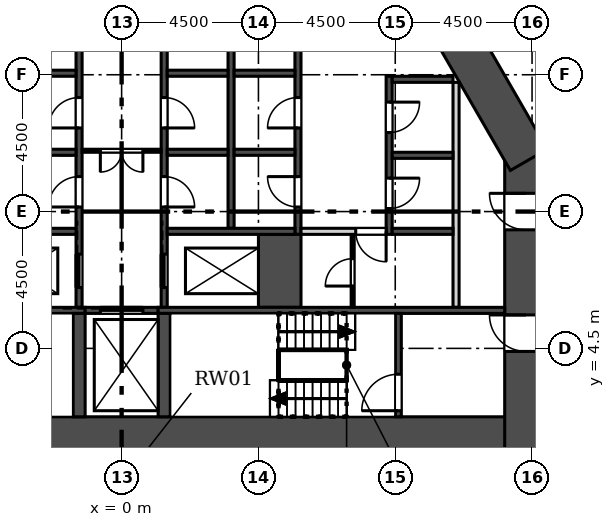
"""IFC4 building model, lengths in metres.
Left out: names, types, materials, properties, quantities, classifications, styles, units other than length and angle.
Written with IfcOpenShell. Run it as: python <this file> out.ifc"""

import sys

from ifc_helpers import new_model, si_unit, direction, frame, frame_2d, origin, place, context, subcontext, project, spatial, rectangle, extrude, element, fill, save


model = new_model("IFC4")
c1 = context("Model", 3, precision=1e-05, world=origin(), true_north=direction((0.0, 1.0)))
c2 = subcontext(c1, "Body", "Model", "MODEL_VIEW")
j1 = project(units=[si_unit("LENGTHUNIT", "METRE"), si_unit("PLANEANGLEUNIT", "RADIAN")], contexts=[c1])
p1 = place(None, origin())
s1 = spatial("IfcSite", under=j1, at=p1, CompositionType="ELEMENT")
p2 = place(p1, origin())
s2 = spatial("IfcBuilding", under=s1, at=p2, CompositionType="ELEMENT")
p3 = place(p2, frame((0.0, 0.0, -14.0)))
s3 = spatial("IfcBuildingStorey", under=s2, at=p3, CompositionType="ELEMENT", Elevation=-14.0)
p4 = place(p3, frame((42.971, 8.51, -0.4), z_axis=(0.0, 0.0, 1.0), x_axis=(-0.499999312333, 0.866025800809, 0.0)))
e1 = element("IfcWall", 1, at=p4, inside=s3, PredefinedType="SOLIDWALL", context=c2, shape_type="SweptSolid", body=[
    extrude(rectangle(XDim=76.231, YDim=0.6, at=frame_2d((38.115, 0.0))), origin(), (0.0, 0.0, 1.0), 6.4),
])
p5 = place(p3, frame((-14.0, 1.55, 0.0), z_axis=(0.0, 0.0, 1.0), x_axis=(1.0, 0.0, 0.0)))
e2 = element("IfcWall", 2, at=p5, inside=s3, PredefinedType="SHEAR", context=c2, shape_type="SweptSolid", body=[
    extrude(rectangle(XDim=28.0, YDim=1.4, at=frame_2d((14.0, 0.0))), origin(), (0.0, 0.0, 1.0), 6.0),
])
p6 = place(p3, frame((13.3, 0.85, 0.0), z_axis=(0.0, 0.0, 1.0), x_axis=(0.0, 1.0, 0.0)))
e3 = element("IfcWall", 3, at=p6, inside=s3, PredefinedType="SHEAR", context=c2, shape_type="SweptSolid", body=[
    extrude(rectangle(XDim=10.202, YDim=1.4, at=frame_2d((5.101, 0.0))), origin(), (0.0, 0.0, 1.0), 6.0),
])
p7 = place(p6, frame((3.55, 0.0, 0.0)))
e4 = element("IfcOpeningElement", 4, at=p7, cuts=e3, PredefinedType="OPENING", context=c2, shape_type="SweptSolid", body=[
    extrude(rectangle(XDim=1.2, YDim=2.1, at=frame_2d((0.6, 1.05))), frame((0.0, 0.71, 0.0), z_axis=(0.0, -1.0, 0.0), x_axis=(1.0, 0.0, 0.0)), (0.0, 0.0, 1.0), 1.42),
])
p8 = place(p6, frame((7.55, 0.0, 0.0)))
e5 = element("IfcOpeningElement", 5, at=p8, cuts=e3, PredefinedType="OPENING", context=c2, shape_type="SweptSolid", body=[
    extrude(rectangle(XDim=1.2, YDim=2.1, at=frame_2d((0.6, 1.05))), frame((0.0, 0.71, 0.0), z_axis=(0.0, -1.0, 0.0), x_axis=(1.0, 0.0, 0.0)), (0.0, 0.0, 1.0), 1.42),
])
p9 = place(p3, frame((13.394, 10.703, 0.0), z_axis=(0.0, 0.0, 1.0), x_axis=(-0.50000187635, 0.866024320471, 0.0)))
e6 = element("IfcWall", 6, at=p9, inside=s3, PredefinedType="SHEAR", context=c2, shape_type="SweptSolid", body=[
    extrude(rectangle(XDim=9.177, YDim=1.4, at=frame_2d((4.588, 0.0))), origin(), (0.0, 0.0, 1.0), 6.0),
])
p10 = place(p3, frame((11.0, 5.85, 0.0), z_axis=(0.0, 0.0, 1.0), x_axis=(0.0, 1.0, 0.0)))
e7 = element("IfcWall", 7, at=p10, inside=s3, PredefinedType="SOLIDWALL", context=c2, shape_type="SweptSolid", body=[
    extrude(rectangle(XDim=7.4, YDim=0.2, at=frame_2d((3.7, 0.0))), origin(), (0.0, 0.0, 1.0), 5.65),
])
p11 = place(p3, frame((8.8, 8.25, 0.0), z_axis=(0.0, 0.0, 1.0), x_axis=(0.0, 1.0, 0.0)))
e8 = element("IfcWall", 8, at=p11, inside=s3, PredefinedType="SOLIDWALL", context=c2, shape_type="SweptSolid", body=[
    extrude(rectangle(XDim=5.2, YDim=0.2, at=frame_2d((2.6, 0.0))), origin(), (0.0, 0.0, 1.0), 5.65),
])
p12 = place(p11, frame((0.85, 0.0, 0.0)))
e9 = element("IfcOpeningElement", 9, at=p12, cuts=e8, PredefinedType="OPENING", context=c2, shape_type="SweptSolid", body=[
    extrude(rectangle(XDim=1.0, YDim=2.1, at=frame_2d((0.5, 1.05))), frame((0.0, 0.11, 0.0), z_axis=(0.0, -1.0, 0.0), x_axis=(1.0, 0.0, 0.0)), (0.0, 0.0, 1.0), 0.22),
])
p13 = place(p11, frame((3.35, 0.0, 0.0)))
e10 = element("IfcOpeningElement", 10, at=p13, cuts=e8, PredefinedType="OPENING", context=c2, shape_type="SweptSolid", body=[
    extrude(rectangle(XDim=1.0, YDim=2.1, at=frame_2d((0.5, 1.05))), frame((0.0, 0.11, 0.0), z_axis=(0.0, -1.0, 0.0), x_axis=(1.0, 0.0, 0.0)), (0.0, 0.0, 1.0), 0.22),
])
p14 = place(p3, frame((5.8, 8.25, 0.0), z_axis=(0.0, 0.0, 1.0), x_axis=(0.0, 1.0, 0.0)))
e11 = element("IfcWall", 11, at=p14, inside=s3, PredefinedType="SOLIDWALL", context=c2, shape_type="SweptSolid", body=[
    extrude(rectangle(XDim=8.0, YDim=0.2, at=frame_2d((4.0, 0.0))), origin(), (0.0, 0.0, 1.0), 5.65),
])
p15 = place(p14, frame((0.9, 0.0, 0.0)))
e12 = element("IfcOpeningElement", 12, at=p15, cuts=e11, PredefinedType="OPENING", context=c2, shape_type="SweptSolid", body=[
    extrude(rectangle(XDim=1.0, YDim=2.1, at=frame_2d((0.5, 1.05))), frame((0.0, 0.11, 0.0), z_axis=(0.0, -1.0, 0.0), x_axis=(1.0, 0.0, 0.0)), (0.0, 0.0, 1.0), 0.22),
])
p16 = place(p14, frame((3.5, 0.0, 0.0)))
e13 = element("IfcOpeningElement", 13, at=p16, cuts=e11, PredefinedType="OPENING", context=c2, shape_type="SweptSolid", body=[
    extrude(rectangle(XDim=1.0, YDim=2.1, at=frame_2d((0.5, 1.05))), frame((0.0, 0.11, 0.0), z_axis=(0.0, -1.0, 0.0), x_axis=(1.0, 0.0, 0.0)), (0.0, 0.0, 1.0), 0.22),
])
p17 = place(p14, frame((6.1, 0.0, 0.0)))
e14 = element("IfcOpeningElement", 14, at=p17, cuts=e11, PredefinedType="OPENING", context=c2, shape_type="SweptSolid", body=[
    extrude(rectangle(XDim=1.0, YDim=2.1, at=frame_2d((0.5, 1.05))), frame((0.0, 0.11, 0.0), z_axis=(0.0, -1.0, 0.0), x_axis=(1.0, 0.0, 0.0)), (0.0, 0.0, 1.0), 0.22),
])
p18 = place(p3, frame((3.6, 8.45, 0.0), z_axis=(0.0, 0.0, 1.0), x_axis=(0.0, 1.0, 0.0)))
e15 = element("IfcWall", 15, at=p18, inside=s3, PredefinedType="SOLIDWALL", context=c2, shape_type="SweptSolid", body=[
    extrude(rectangle(XDim=7.8, YDim=0.2, at=frame_2d((3.9, 0.0))), origin(), (0.0, 0.0, 1.0), 5.65),
])
p19 = place(p3, frame((-1.4, 5.85, 0.0), z_axis=(0.0, 0.0, 1.0), x_axis=(0.0, 1.0, 0.0)))
e16 = element("IfcWall", 16, at=p19, inside=s3, PredefinedType="SOLIDWALL", context=c2, shape_type="SweptSolid", body=[
    extrude(rectangle(XDim=11.75, YDim=0.2, at=frame_2d((5.875, 0.0))), origin(), (0.0, 0.0, 1.0), 5.65),
])
p20 = place(p19, frame((0.65, 0.0, 0.0)))
e17 = element("IfcOpeningElement", 17, at=p20, cuts=e16, PredefinedType="OPENING", context=c2, shape_type="SweptSolid", body=[
    extrude(rectangle(XDim=1.1, YDim=2.1, at=frame_2d((0.55, 1.05))), frame((0.0, 0.11, 0.0), z_axis=(0.0, -1.0, 0.0), x_axis=(1.0, 0.0, 0.0)), (0.0, 0.0, 1.0), 0.22),
])
p21 = place(p19, frame((3.3, 0.0, 0.0)))
e18 = element("IfcOpeningElement", 18, at=p21, cuts=e16, PredefinedType="OPENING", context=c2, shape_type="SweptSolid", body=[
    extrude(rectangle(XDim=1.0, YDim=2.1, at=frame_2d((0.5, 1.05))), frame((0.0, 0.11, 0.0), z_axis=(0.0, -1.0, 0.0), x_axis=(1.0, 0.0, 0.0)), (0.0, 0.0, 1.0), 0.22),
])
p22 = place(p19, frame((5.9, 0.0, 0.0)))
e19 = element("IfcOpeningElement", 19, at=p22, cuts=e16, PredefinedType="OPENING", context=c2, shape_type="SweptSolid", body=[
    extrude(rectangle(XDim=1.0, YDim=2.1, at=frame_2d((0.5, 1.05))), frame((0.0, 0.11, 0.0), z_axis=(0.0, -1.0, 0.0), x_axis=(1.0, 0.0, 0.0)), (0.0, 0.0, 1.0), 0.22),
])
p23 = place(p19, frame((8.5, 0.0, 0.0)))
e20 = element("IfcOpeningElement", 20, at=p23, cuts=e16, PredefinedType="OPENING", context=c2, shape_type="SweptSolid", body=[
    extrude(rectangle(XDim=1.0, YDim=2.1, at=frame_2d((0.5, 1.05))), frame((0.0, 0.11, 0.0), z_axis=(0.0, -1.0, 0.0), x_axis=(1.0, 0.0, 0.0)), (0.0, 0.0, 1.0), 0.22),
])
p24 = place(p3, frame((1.4, 5.85, 0.0), z_axis=(0.0, 0.0, 1.0), x_axis=(0.0, 1.0, 0.0)))
e21 = element("IfcWall", 21, at=p24, inside=s3, PredefinedType="SOLIDWALL", context=c2, shape_type="SweptSolid", body=[
    extrude(rectangle(XDim=11.75, YDim=0.2, at=frame_2d((5.875, 0.0))), origin(), (0.0, 0.0, 1.0), 5.65),
])
p25 = place(p24, frame((0.65, 0.0, 0.0)))
e22 = element("IfcOpeningElement", 22, at=p25, cuts=e21, PredefinedType="OPENING", context=c2, shape_type="SweptSolid", body=[
    extrude(rectangle(XDim=1.1, YDim=2.1, at=frame_2d((0.55, 1.05))), frame((0.0, 0.11, 0.0), z_axis=(0.0, -1.0, 0.0), x_axis=(1.0, 0.0, 0.0)), (0.0, 0.0, 1.0), 0.22),
])
p26 = place(p24, frame((3.3, 0.0, 0.0)))
e23 = element("IfcOpeningElement", 23, at=p26, cuts=e21, PredefinedType="OPENING", context=c2, shape_type="SweptSolid", body=[
    extrude(rectangle(XDim=1.0, YDim=2.1, at=frame_2d((0.5, 1.05))), frame((0.0, 0.11, 0.0), z_axis=(0.0, -1.0, 0.0), x_axis=(1.0, 0.0, 0.0)), (0.0, 0.0, 1.0), 0.22),
])
p27 = place(p24, frame((5.9, 0.0, 0.0)))
e24 = element("IfcOpeningElement", 24, at=p27, cuts=e21, PredefinedType="OPENING", context=c2, shape_type="SweptSolid", body=[
    extrude(rectangle(XDim=1.0, YDim=2.1, at=frame_2d((0.5, 1.05))), frame((0.0, 0.11, 0.0), z_axis=(0.0, -1.0, 0.0), x_axis=(1.0, 0.0, 0.0)), (0.0, 0.0, 1.0), 0.22),
])
p28 = place(p24, frame((8.5, 0.0, 0.0)))
e25 = element("IfcOpeningElement", 25, at=p28, cuts=e21, PredefinedType="OPENING", context=c2, shape_type="SweptSolid", body=[
    extrude(rectangle(XDim=1.0, YDim=2.1, at=frame_2d((0.5, 1.05))), frame((0.0, 0.11, 0.0), z_axis=(0.0, -1.0, 0.0), x_axis=(1.0, 0.0, 0.0)), (0.0, 0.0, 1.0), 0.22),
])
p29 = place(p3, frame((5.2, 5.85, 0.0), z_axis=(0.0, 0.0, 1.0), x_axis=(0.0, 1.0, 0.0)))
e26 = element("IfcWall", 26, at=p29, inside=s3, PredefinedType="SOLIDWALL", context=c2, shape_type="SweptSolid", body=[
    extrude(rectangle(XDim=2.4, YDim=1.4, at=frame_2d((1.2, 0.0))), origin(), (0.0, 0.0, 1.0), 5.65),
])
p30 = place(p3, frame((8.9, 8.35, 0.0), z_axis=(0.0, 0.0, 1.0), x_axis=(1.0, 0.0, 0.0)))
e27 = element("IfcWall", 27, at=p30, inside=s3, PredefinedType="SOLIDWALL", context=c2, shape_type="SweptSolid", body=[
    extrude(rectangle(XDim=2.0, YDim=0.2, at=frame_2d((1.0, 0.0))), origin(), (0.0, 0.0, 1.0), 5.65),
])
for number, where, z_axis, x_axis in (
    (28, (-5.7, 8.35, 0.0), (0.0, 0.0, 1.0), (1.0, 0.0, 0.0)),
    (29, (1.5, 8.35, 0.0), (0.0, 0.0, 1.0), (1.0, 0.0, 0.0)),
):
    element("IfcWall", number, at=place(p3, frame(where, z_axis=z_axis, x_axis=x_axis)), inside=s3, PredefinedType="SOLIDWALL", context=c2, shape_type="SweptSolid", body=[
        extrude(rectangle(XDim=4.2, YDim=0.2, at=frame_2d((2.1, 0.0))), origin(), (0.0, 0.0, 1.0), 5.65),
    ])
p31 = place(p3, frame((-12.6, 5.75, 0.0), z_axis=(0.0, 0.0, 1.0), x_axis=(1.0, 0.0, 0.0)))
e30 = element("IfcWall", 30, at=p31, inside=s3, PredefinedType="SOLIDWALL", context=c2, shape_type="SweptSolid", body=[
    extrude(rectangle(XDim=11.4, YDim=0.2, at=frame_2d((5.7, 0.0))), origin(), (0.0, 0.0, 1.0), 5.65),
])
p32 = place(p3, frame((-1.2, 5.75, 0.0), z_axis=(0.0, 0.0, 1.0), x_axis=(1.0, 0.0, 0.0)))
e31 = element("IfcWall", 31, at=p32, inside=s3, PredefinedType="SOLIDWALL", context=c2, shape_type="SweptSolid", body=[
    extrude(rectangle(XDim=2.4, YDim=0.2, at=frame_2d((1.2, 0.0))), origin(), (0.0, 0.0, 1.0), 5.65),
])
p33 = place(p32, frame((0.5, 0.0, 0.0)))
e32 = element("IfcOpeningElement", 32, at=p33, cuts=e31, PredefinedType="OPENING", context=c2, shape_type="SweptSolid", body=[
    extrude(rectangle(XDim=1.4, YDim=2.1, at=frame_2d((0.7, 1.05))), frame((0.0, 0.11, 0.0), z_axis=(0.0, -1.0, 0.0), x_axis=(1.0, 0.0, 0.0)), (0.0, 0.0, 1.0), 0.22),
])
p34 = place(p3, frame((1.2, 5.75, 0.0), z_axis=(0.0, 0.0, 1.0), x_axis=(1.0, 0.0, 0.0)))
e33 = element("IfcWall", 33, at=p34, inside=s3, PredefinedType="SOLIDWALL", context=c2, shape_type="SweptSolid", body=[
    extrude(rectangle(XDim=11.4, YDim=0.2, at=frame_2d((5.7, 0.0))), origin(), (0.0, 0.0, 1.0), 5.65),
])
p35 = place(p3, frame((9.1, 2.25, 0.0), z_axis=(0.0, 0.0, 1.0), x_axis=(0.0, 1.0, 0.0)))
e34 = element("IfcWall", 34, at=p35, inside=s3, PredefinedType="SOLIDWALL", context=c2, shape_type="SweptSolid", body=[
    extrude(rectangle(XDim=3.4, YDim=0.2, at=frame_2d((1.7, 0.0))), origin(), (0.0, 0.0, 1.0), 5.65),
])
p36 = place(p35, frame((0.2, 0.0, 0.0)))
e35 = element("IfcOpeningElement", 35, at=p36, cuts=e34, PredefinedType="OPENING", context=c2, shape_type="SweptSolid", body=[
    extrude(rectangle(XDim=1.2, YDim=2.1, at=frame_2d((0.6, 1.05))), frame((0.0, 0.11, 0.0), z_axis=(0.0, -1.0, 0.0), x_axis=(1.0, 0.0, 0.0)), (0.0, 0.0, 1.0), 0.22),
])
for number, where, z_axis, x_axis in (
    (36, (-1.4, 2.25, 0.0), (0.0, 0.0, 1.0), (0.0, 1.0, 0.0)),
    (37, (1.4, 2.25, 0.0), (0.0, 0.0, 1.0), (0.0, 1.0, 0.0)),
):
    element("IfcWall", number, at=place(p3, frame(where, z_axis=z_axis, x_axis=x_axis)), inside=s3, PredefinedType="SOLIDWALL", context=c2, shape_type="SweptSolid", body=[
        extrude(rectangle(XDim=3.4, YDim=0.4, at=frame_2d((1.7, 0.0))), origin(), (0.0, 0.0, 1.0), 5.65),
    ])
for number, where, z_axis, x_axis in (
    (38, (-3.5, 10.95, 0.0), (0.0, 0.0, 1.0), (1.0, 0.0, 0.0)),
    (39, (-3.5, 13.55, 0.0), (0.0, 0.0, 1.0), (1.0, 0.0, 0.0)),
    (40, (8.9, 10.85, 0.0), (0.0, 0.0, 1.0), (1.0, 0.0, 0.0)),
    (41, (8.9, 13.35, 0.0), (0.0, 0.0, 1.0), (1.0, 0.0, 0.0)),
    (42, (3.7, 10.95, 0.0), (0.0, 0.0, 1.0), (1.0, 0.0, 0.0)),
    (43, (3.7, 13.55, 0.0), (0.0, 0.0, 1.0), (1.0, 0.0, 0.0)),
    (44, (1.5, 10.95, 0.0), (0.0, 0.0, 1.0), (1.0, 0.0, 0.0)),
    (45, (1.5, 13.55, 0.0), (0.0, 0.0, 1.0), (1.0, 0.0, 0.0)),
):
    element("IfcWall", number, at=place(p3, frame(where, z_axis=z_axis, x_axis=x_axis)), inside=s3, PredefinedType="SOLIDWALL", context=c2, shape_type="SweptSolid", body=[
        extrude(rectangle(XDim=2.0, YDim=0.2, at=frame_2d((1.0, 0.0))), origin(), (0.0, 0.0, 1.0), 5.65),
    ])
p37 = place(p3, frame((7.6, 5.85, 0.0), z_axis=(0.0, 0.0, 1.0), x_axis=(0.0, 1.0, 0.0)))
e46 = element("IfcWall", 46, at=p37, inside=s3, PredefinedType="PARTITIONING", context=c2, shape_type="SweptSolid", body=[
    extrude(rectangle(XDim=2.4, YDim=0.1, at=frame_2d((1.2, 0.0))), origin(), (0.0, 0.0, 1.0), 5.65),
])
p38 = place(p37, frame((0.7, 0.0, 0.0)))
e47 = element("IfcOpeningElement", 47, at=p38, cuts=e46, PredefinedType="OPENING", context=c2, shape_type="SweptSolid", body=[
    extrude(rectangle(XDim=0.9, YDim=2.1, at=frame_2d((0.45, 1.05))), frame((0.0, 0.06, 0.0), z_axis=(0.0, -1.0, 0.0), x_axis=(1.0, 0.0, 0.0)), (0.0, 0.0, 1.0), 0.12),
])
p39 = place(p3, frame((5.9, 8.35, 0.0), z_axis=(0.0, 0.0, 1.0), x_axis=(1.0, 0.0, 0.0)))
e48 = element("IfcWall", 48, at=p39, inside=s3, PredefinedType="SOLIDWALL", context=c2, shape_type="SweptSolid", body=[
    extrude(rectangle(XDim=2.8, YDim=0.2, at=frame_2d((1.4, 0.0))), origin(), (0.0, 0.0, 1.0), 5.65),
])
p40 = place(p39, frame((1.8, 0.0, 0.0)))
e49 = element("IfcOpeningElement", 49, at=p40, cuts=e48, PredefinedType="OPENING", context=c2, shape_type="SweptSolid", body=[
    extrude(rectangle(XDim=1.0, YDim=2.1, at=frame_2d((0.5, 1.05))), frame((0.0, 0.11, 0.0), z_axis=(0.0, -1.0, 0.0), x_axis=(1.0, 0.0, 0.0)), (0.0, 0.0, 1.0), 0.22),
])
p41 = place(p3, frame((-1.3, 11.0, 0.0), z_axis=(0.0, 0.0, 1.0), x_axis=(1.0, 0.0, 0.0)))
e50 = element("IfcWall", 50, at=p41, inside=s3, PredefinedType="PARTITIONING", context=c2, shape_type="SweptSolid", body=[
    extrude(rectangle(XDim=2.6, YDim=0.1, at=frame_2d((1.3, 0.0))), origin(), (0.0, 0.0, 1.0), 5.65),
])
p42 = place(p41, frame((0.6, 0.0, 0.0)))
e51 = element("IfcOpeningElement", 51, at=p42, cuts=e50, PredefinedType="OPENING", context=c2, shape_type="SweptSolid", body=[
    extrude(rectangle(XDim=1.4, YDim=2.1, at=frame_2d((0.7, 1.05))), frame((0.0, 0.06, 0.0), z_axis=(0.0, -1.0, 0.0), x_axis=(1.0, 0.0, 0.0)), (0.0, 0.0, 1.0), 0.12),
])
p43 = place(p20, origin())
e52 = element("IfcDoor", 52, at=p43, inside=s3, OperationType="SLIDING_TO_RIGHT", PredefinedType="DOOR", context=c2, shape_type="SweptSolid", body=[
    extrude(rectangle(XDim=1.1, YDim=2.1, at=frame_2d((0.55, 1.05))), frame((0.0, 0.025, 0.0), z_axis=(0.0, -1.0, 0.0), x_axis=(1.0, 0.0, 0.0)), (0.0, 0.0, 1.0), 0.05),
])
fill(e17, e52)
p44 = place(p25, origin())
e53 = element("IfcDoor", 53, at=p44, inside=s3, OperationType="SLIDING_TO_RIGHT", PredefinedType="DOOR", context=c2, shape_type="SweptSolid", body=[
    extrude(rectangle(XDim=1.1, YDim=2.1, at=frame_2d((0.55, 1.05))), frame((0.0, 0.025, 0.0), z_axis=(0.0, -1.0, 0.0), x_axis=(1.0, 0.0, 0.0)), (0.0, 0.0, 1.0), 0.05),
])
fill(e22, e53)
p45 = place(p33, origin())
e54 = element("IfcDoor", 54, at=p45, inside=s3, OperationType="SLIDING_TO_LEFT", PredefinedType="DOOR", context=c2, shape_type="SweptSolid", body=[
    extrude(rectangle(XDim=1.4, YDim=2.1, at=frame_2d((0.7, 1.05))), frame((0.0, 0.025, 0.0), z_axis=(0.0, -1.0, 0.0), x_axis=(1.0, 0.0, 0.0)), (0.0, 0.0, 1.0), 0.05),
])
fill(e32, e54)
p46 = place(p21, origin())
e55 = element("IfcDoor", 55, at=p46, inside=s3, OperationType="SINGLE_SWING_LEFT", PredefinedType="DOOR", context=c2, shape_type="SweptSolid", body=[
    extrude(rectangle(XDim=1.0, YDim=2.1, at=frame_2d((0.5, 1.05))), frame((0.0, 0.025, 0.0), z_axis=(0.0, -1.0, 0.0), x_axis=(1.0, 0.0, 0.0)), (0.0, 0.0, 1.0), 0.05),
])
fill(e18, e55)
p47 = place(p22, origin())
e56 = element("IfcDoor", 56, at=p47, inside=s3, OperationType="SINGLE_SWING_LEFT", PredefinedType="DOOR", context=c2, shape_type="SweptSolid", body=[
    extrude(rectangle(XDim=1.0, YDim=2.1, at=frame_2d((0.5, 1.05))), frame((0.0, 0.025, 0.0), z_axis=(0.0, -1.0, 0.0), x_axis=(1.0, 0.0, 0.0)), (0.0, 0.0, 1.0), 0.05),
])
fill(e19, e56)
p48 = place(p12, frame((1.0, 0.0, 0.0), z_axis=(0.0, 0.0, 1.0), x_axis=(-1.0, 0.0, 0.0)))
e57 = element("IfcDoor", 57, at=p48, inside=s3, OperationType="SINGLE_SWING_LEFT", PredefinedType="DOOR", context=c2, shape_type="SweptSolid", body=[
    extrude(rectangle(XDim=1.0, YDim=2.1, at=frame_2d((0.5, 1.05))), frame((0.0, 0.025, 0.0), z_axis=(0.0, -1.0, 0.0), x_axis=(1.0, 0.0, 0.0)), (0.0, 0.0, 1.0), 0.05),
])
fill(e9, e57)
p49 = place(p13, frame((1.0, 0.0, 0.0), z_axis=(0.0, 0.0, 1.0), x_axis=(-1.0, 0.0, 0.0)))
e58 = element("IfcDoor", 58, at=p49, inside=s3, OperationType="SINGLE_SWING_LEFT", PredefinedType="DOOR", context=c2, shape_type="SweptSolid", body=[
    extrude(rectangle(XDim=1.0, YDim=2.1, at=frame_2d((0.5, 1.05))), frame((0.0, 0.025, 0.0), z_axis=(0.0, -1.0, 0.0), x_axis=(1.0, 0.0, 0.0)), (0.0, 0.0, 1.0), 0.05),
])
fill(e10, e58)
p50 = place(p15, origin())
e59 = element("IfcDoor", 59, at=p50, inside=s3, OperationType="SINGLE_SWING_RIGHT", PredefinedType="DOOR", context=c2, shape_type="SweptSolid", body=[
    extrude(rectangle(XDim=1.0, YDim=2.1, at=frame_2d((0.5, 1.05))), frame((0.0, 0.025, 0.0), z_axis=(0.0, -1.0, 0.0), x_axis=(1.0, 0.0, 0.0)), (0.0, 0.0, 1.0), 0.05),
])
fill(e12, e59)
p51 = place(p16, origin())
e60 = element("IfcDoor", 60, at=p51, inside=s3, OperationType="SINGLE_SWING_LEFT", PredefinedType="DOOR", context=c2, shape_type="SweptSolid", body=[
    extrude(rectangle(XDim=1.0, YDim=2.1, at=frame_2d((0.5, 1.05))), frame((0.0, 0.025, 0.0), z_axis=(0.0, -1.0, 0.0), x_axis=(1.0, 0.0, 0.0)), (0.0, 0.0, 1.0), 0.05),
])
fill(e13, e60)
p52 = place(p26, frame((1.0, 0.0, 0.0), z_axis=(0.0, 0.0, 1.0), x_axis=(-1.0, 0.0, 0.0)))
e61 = element("IfcDoor", 61, at=p52, inside=s3, OperationType="SINGLE_SWING_RIGHT", PredefinedType="DOOR", context=c2, shape_type="SweptSolid", body=[
    extrude(rectangle(XDim=1.0, YDim=2.1, at=frame_2d((0.5, 1.05))), frame((0.0, 0.025, 0.0), z_axis=(0.0, -1.0, 0.0), x_axis=(1.0, 0.0, 0.0)), (0.0, 0.0, 1.0), 0.05),
])
fill(e23, e61)
p53 = place(p27, frame((1.0, 0.0, 0.0), z_axis=(0.0, 0.0, 1.0), x_axis=(-1.0, 0.0, 0.0)))
e62 = element("IfcDoor", 62, at=p53, inside=s3, OperationType="SINGLE_SWING_RIGHT", PredefinedType="DOOR", context=c2, shape_type="SweptSolid", body=[
    extrude(rectangle(XDim=1.0, YDim=2.1, at=frame_2d((0.5, 1.05))), frame((0.0, 0.025, 0.0), z_axis=(0.0, -1.0, 0.0), x_axis=(1.0, 0.0, 0.0)), (0.0, 0.0, 1.0), 0.05),
])
fill(e24, e62)
p54 = place(p40, frame((1.0, 0.0, 0.0), z_axis=(0.0, 0.0, 1.0), x_axis=(-1.0, 0.0, 0.0)))
e63 = element("IfcDoor", 63, at=p54, inside=s3, OperationType="SINGLE_SWING_LEFT", PredefinedType="DOOR", context=c2, shape_type="SweptSolid", body=[
    extrude(rectangle(XDim=1.0, YDim=2.1, at=frame_2d((0.5, 1.05))), frame((0.0, 0.025, 0.0), z_axis=(0.0, -1.0, 0.0), x_axis=(1.0, 0.0, 0.0)), (0.0, 0.0, 1.0), 0.05),
])
fill(e49, e63)
p55 = place(p38, origin())
e64 = element("IfcDoor", 64, at=p55, inside=s3, OperationType="SINGLE_SWING_LEFT", PredefinedType="DOOR", context=c2, shape_type="SweptSolid", body=[
    extrude(rectangle(XDim=0.9, YDim=2.1, at=frame_2d((0.45, 1.05))), frame((0.0, 0.025, 0.0), z_axis=(0.0, -1.0, 0.0), x_axis=(1.0, 0.0, 0.0)), (0.0, 0.0, 1.0), 0.05),
])
fill(e47, e64)
p56 = place(p7, origin())
e65 = element("IfcDoor", 65, at=p56, inside=s3, OperationType="SINGLE_SWING_RIGHT", PredefinedType="DOOR", context=c2, shape_type="SweptSolid", body=[
    extrude(rectangle(XDim=1.2, YDim=2.1, at=frame_2d((0.6, 1.05))), frame((0.0, 0.025, 0.0), z_axis=(0.0, -1.0, 0.0), x_axis=(1.0, 0.0, 0.0)), (0.0, 0.0, 1.0), 0.05),
])
fill(e4, e65)
p57 = place(p36, origin())
e66 = element("IfcDoor", 66, at=p57, inside=s3, OperationType="SINGLE_SWING_LEFT", PredefinedType="DOOR", context=c2, shape_type="SweptSolid", body=[
    extrude(rectangle(XDim=1.2, YDim=2.1, at=frame_2d((0.6, 1.05))), frame((0.0, 0.025, 0.0), z_axis=(0.0, -1.0, 0.0), x_axis=(1.0, 0.0, 0.0)), (0.0, 0.0, 1.0), 0.05),
])
fill(e35, e66)
p58 = place(p8, origin())
e67 = element("IfcDoor", 67, at=p58, inside=s3, OperationType="SINGLE_SWING_RIGHT", PredefinedType="DOOR", context=c2, shape_type="SweptSolid", body=[
    extrude(rectangle(XDim=1.2, YDim=2.1, at=frame_2d((0.6, 1.05))), frame((0.0, 0.025, 0.0), z_axis=(0.0, -1.0, 0.0), x_axis=(1.0, 0.0, 0.0)), (0.0, 0.0, 1.0), 0.05),
])
fill(e5, e67)
p59 = place(p42, frame((1.4, 0.0, 0.0), z_axis=(0.0, 0.0, 1.0), x_axis=(-1.0, 0.0, 0.0)))
e68 = element("IfcDoor", 68, at=p59, inside=s3, OperationType="DOUBLE_DOOR_SINGLE_SWING", PredefinedType="DOOR", context=c2, shape_type="SweptSolid", body=[
    extrude(rectangle(XDim=1.4, YDim=2.1, at=frame_2d((0.7, 1.05))), frame((0.0, 0.025, 0.0), z_axis=(0.0, -1.0, 0.0), x_axis=(1.0, 0.0, 0.0)), (0.0, 0.0, 1.0), 0.05),
])
fill(e51, e68)
save(model, sys.argv[1])
